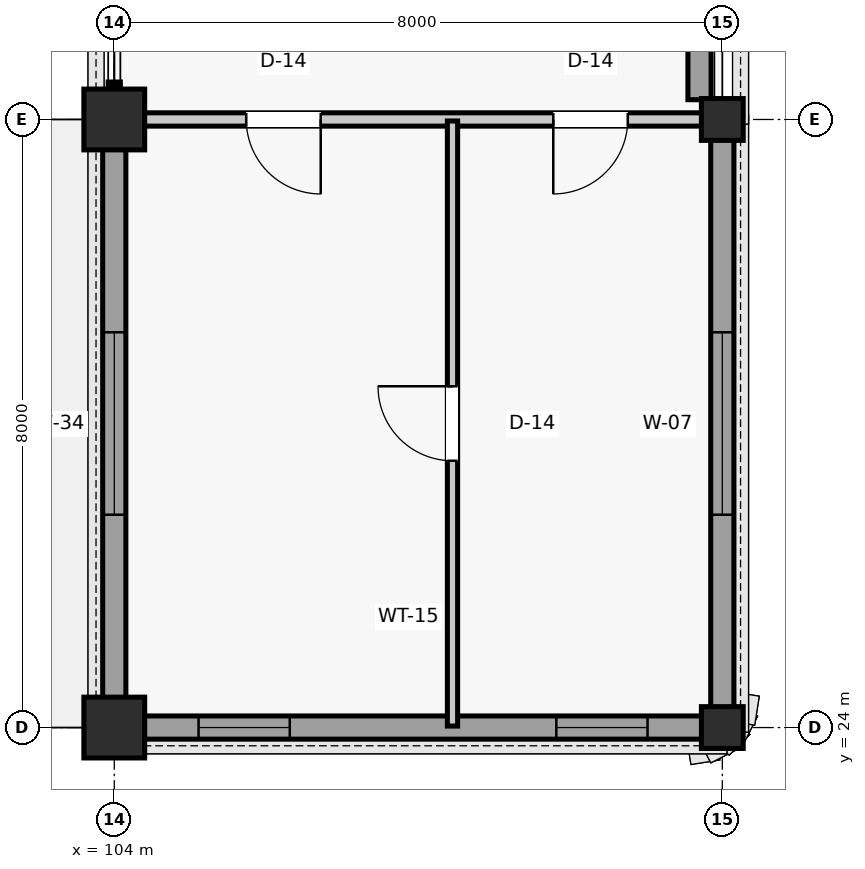
"""IFC4 building model, lengths in metres.
Left out: names, types, materials, properties, quantities, classifications, styles, units other than length and angle.
Written with IfcOpenShell. Run it as: python <this file> out.ifc"""

import sys

from ifc_helpers import new_model, si_unit, direction, frame, frame_2d, origin, origin_2d, place, context, subcontext, project, spatial, rectangle, extrude, element, fill, save


model = new_model("IFC4")
c1 = context("Model", 3, precision=1e-05, world=origin(), true_north=direction((0.0, 1.0)))
c2 = subcontext(c1, "Body", "Model", "MODEL_VIEW")
j1 = project(units=[si_unit("LENGTHUNIT", "METRE"), si_unit("PLANEANGLEUNIT", "RADIAN")], contexts=[c1])
p1 = place(None, origin())
s1 = spatial("IfcSite", under=j1, at=p1, CompositionType="ELEMENT")
p2 = place(p1, origin())
s2 = spatial("IfcBuilding", under=s1, at=p2, CompositionType="ELEMENT")
p3 = place(p2, frame((0.0, 0.0, 17.82)))
s3 = spatial("IfcBuildingStorey", under=s2, at=p3, CompositionType="ELEMENT", Elevation=17.82)
for number, where, z_axis, x_axis in (
    (1, (104.0, 24.0, 0.0), (0.0, 0.0, 1.0), (1.0, 0.0, 0.0)),
    (2, (104.0, 32.0, 0.0), (0.0, 0.0, 1.0), (1.0, 0.0, 0.0)),
):
    element("IfcColumn", number, at=place(p3, frame(where, z_axis=z_axis, x_axis=x_axis)), inside=s3, PredefinedType="COLUMN", context=c2, shape_type="SweptSolid", body=[
        extrude(rectangle(XDim=0.8, YDim=0.8, at=origin_2d()), origin(), (0.0, 0.0, 1.0), 3.96),
    ])
for number, where, z_axis, x_axis in (
    (3, (112.0, 24.0, 0.0), (0.0, 0.0, 1.0), (1.0, 0.0, 0.0)),
    (4, (112.0, 32.0, 0.0), (0.0, 0.0, 1.0), (1.0, 0.0, 0.0)),
):
    element("IfcColumn", number, at=place(p3, frame(where, z_axis=z_axis, x_axis=x_axis)), inside=s3, PredefinedType="COLUMN", context=c2, shape_type="SweptSolid", body=[
        extrude(rectangle(XDim=0.55, YDim=0.55, at=origin_2d()), origin(), (0.0, 0.0, 1.0), 3.96),
    ])
p4 = place(p3, frame((104.385, 24.0, 0.0), z_axis=(0.0, 0.0, 1.0), x_axis=(1.0, 0.0, 0.0)))
e5 = element("IfcWall", 5, at=p4, inside=s3, PredefinedType="SOLIDWALL", context=c2, shape_type="SweptSolid", body=[
    extrude(rectangle(XDim=7.355, YDim=0.305, at=frame_2d((3.677, 0.0))), origin(), (0.0, 0.0, 1.0), 2.817),
])
p5 = place(p4, frame((0.724, 0.0, 0.95)))
e6 = element("IfcOpeningElement", 6, at=p5, cuts=e5, PredefinedType="OPENING", context=c2, shape_type="SweptSolid", body=[
    extrude(rectangle(XDim=1.2, YDim=1.8, at=frame_2d((0.6, 0.9))), frame((0.0, 0.162, 0.0), z_axis=(0.0, -1.0, 0.0), x_axis=(1.0, 0.0, 0.0)), (0.0, 0.0, 1.0), 0.325),
])
p6 = place(p4, frame((5.431, 0.0, 0.95)))
e7 = element("IfcOpeningElement", 7, at=p6, cuts=e5, PredefinedType="OPENING", context=c2, shape_type="SweptSolid", body=[
    extrude(rectangle(XDim=1.2, YDim=1.8, at=frame_2d((0.6, 0.9))), frame((0.0, 0.162, 0.0), z_axis=(0.0, -1.0, 0.0), x_axis=(1.0, 0.0, 0.0)), (0.0, 0.0, 1.0), 0.325),
])
p7 = place(p3, frame((104.0, 24.385, 0.0), z_axis=(0.0, 0.0, 1.0), x_axis=(0.0, 1.0, 0.0)))
e8 = element("IfcWall", 8, at=p7, inside=s3, PredefinedType="SOLIDWALL", context=c2, shape_type="SweptSolid", body=[
    extrude(rectangle(XDim=7.23, YDim=0.305, at=frame_2d((3.615, 0.0))), origin(), (0.0, 0.0, 1.0), 3.002),
])
p8 = place(p7, frame((2.415, 0.0, 0.9)))
e9 = element("IfcOpeningElement", 9, at=p8, cuts=e8, PredefinedType="OPENING", context=c2, shape_type="SweptSolid", body=[
    extrude(rectangle(XDim=2.4, YDim=1.902, at=frame_2d((1.2, 0.951))), frame((0.0, 0.162, 0.0), z_axis=(0.0, -1.0, 0.0), x_axis=(1.0, 0.0, 0.0)), (0.0, 0.0, 1.0), 0.325),
])
p9 = place(p3, frame((112.0, 24.26, 0.0), z_axis=(0.0, 0.0, 1.0), x_axis=(0.0, 1.0, 0.0)))
e10 = element("IfcWall", 10, at=p9, inside=s3, PredefinedType="SOLIDWALL", context=c2, shape_type="SweptSolid", body=[
    extrude(rectangle(XDim=7.48, YDim=0.305, at=frame_2d((3.74, 0.0))), origin(), (0.0, 0.0, 1.0), 3.349),
])
p10 = place(p9, frame((2.54, 0.0, 0.9)))
e11 = element("IfcOpeningElement", 11, at=p10, cuts=e10, PredefinedType="OPENING", context=c2, shape_type="SweptSolid", body=[
    extrude(rectangle(XDim=2.4, YDim=2.0, at=frame_2d((1.2, 1.0))), frame((0.0, 0.162, 0.0), z_axis=(0.0, -1.0, 0.0), x_axis=(1.0, 0.0, 0.0)), (0.0, 0.0, 1.0), 0.325),
])
p11 = place(p3, frame((111.7, 32.26, 0.0), z_axis=(0.0, 0.0, 1.0), x_axis=(0.0, 1.0, 0.0)))
e12 = element("IfcWall", 12, at=p11, inside=s3, PredefinedType="SOLIDWALL", context=c2, shape_type="SweptSolid", body=[
    extrude(rectangle(XDim=7.48, YDim=0.305, at=frame_2d((3.74, 0.0))), origin(), (0.0, 0.0, 1.0), 3.289),
])
p12 = place(p3, frame((104.39, 32.0, 0.0), z_axis=(0.0, 0.0, 1.0), x_axis=(1.0, 0.0, 0.0)))
e13 = element("IfcWall", 13, at=p12, inside=s3, PredefinedType="PARTITIONING", context=c2, shape_type="SweptSolid", body=[
    extrude(rectangle(XDim=7.345, YDim=0.175, at=frame_2d((3.673, 0.0))), origin(), (0.0, 0.0, 1.0), 3.238),
])
p13 = place(p12, frame((1.346, 0.0, 0.0)))
e14 = element("IfcOpeningElement", 14, at=p13, cuts=e13, PredefinedType="OPENING", context=c2, shape_type="SweptSolid", body=[
    extrude(rectangle(XDim=0.98, YDim=2.15, at=frame_2d((0.49, 1.075))), frame((0.0, 0.097, 0.0), z_axis=(0.0, -1.0, 0.0), x_axis=(1.0, 0.0, 0.0)), (0.0, 0.0, 1.0), 0.195),
])
p14 = place(p12, frame((5.386, 0.0, 0.0)))
e15 = element("IfcOpeningElement", 15, at=p14, cuts=e13, PredefinedType="OPENING", context=c2, shape_type="SweptSolid", body=[
    extrude(rectangle(XDim=0.98, YDim=2.15, at=frame_2d((0.49, 1.075))), frame((0.0, 0.097, 0.0), z_axis=(0.0, -1.0, 0.0), x_axis=(1.0, 0.0, 0.0)), (0.0, 0.0, 1.0), 0.195),
])
p15 = place(p3, frame((108.45, 24.02, 0.0), z_axis=(0.0, 0.0, 1.0), x_axis=(0.0, 1.0, 0.0)))
e16 = element("IfcWall", 16, at=p15, inside=s3, PredefinedType="PARTITIONING", context=c2, shape_type="SweptSolid", body=[
    extrude(rectangle(XDim=7.96, YDim=0.135, at=frame_2d((3.98, 0.0))), origin(), (0.0, 0.0, 1.0), 2.81),
])
p16 = place(p15, frame((3.49, 0.0, 0.0)))
e17 = element("IfcOpeningElement", 17, at=p16, cuts=e16, PredefinedType="OPENING", context=c2, shape_type="SweptSolid", body=[
    extrude(rectangle(XDim=0.98, YDim=2.15, at=frame_2d((0.49, 1.075))), frame((0.0, 0.077, 0.0), z_axis=(0.0, -1.0, 0.0), x_axis=(1.0, 0.0, 0.0)), (0.0, 0.0, 1.0), 0.155),
])
p17 = place(p5, origin())
e18 = element("IfcWindow", 18, at=p17, inside=s3, PartitioningType="SINGLE_PANEL", PredefinedType="WINDOW", context=c2, shape_type="SweptSolid", body=[
    extrude(rectangle(XDim=1.2, YDim=1.8, at=frame_2d((0.6, 0.9))), frame((0.0, 0.03, 0.0), z_axis=(0.0, -1.0, 0.0), x_axis=(1.0, 0.0, 0.0)), (0.0, 0.0, 1.0), 0.06),
])
fill(e6, e18)
p18 = place(p6, origin())
e19 = element("IfcWindow", 19, at=p18, inside=s3, PartitioningType="SINGLE_PANEL", PredefinedType="WINDOW", context=c2, shape_type="SweptSolid", body=[
    extrude(rectangle(XDim=1.2, YDim=1.8, at=frame_2d((0.6, 0.9))), frame((0.0, 0.03, 0.0), z_axis=(0.0, -1.0, 0.0), x_axis=(1.0, 0.0, 0.0)), (0.0, 0.0, 1.0), 0.06),
])
fill(e7, e19)
p19 = place(p8, origin())
e20 = element("IfcWindow", 20, at=p19, inside=s3, PartitioningType="SINGLE_PANEL", PredefinedType="WINDOW", context=c2, shape_type="SweptSolid", body=[
    extrude(rectangle(XDim=2.4, YDim=1.902, at=frame_2d((1.2, 0.951))), frame((0.0, 0.03, 0.0), z_axis=(0.0, -1.0, 0.0), x_axis=(1.0, 0.0, 0.0)), (0.0, 0.0, 1.0), 0.06),
])
fill(e9, e20)
p20 = place(p10, origin())
e21 = element("IfcWindow", 21, at=p20, inside=s3, PartitioningType="SINGLE_PANEL", PredefinedType="WINDOW", context=c2, shape_type="SweptSolid", body=[
    extrude(rectangle(XDim=2.4, YDim=2.0, at=frame_2d((1.2, 1.0))), frame((0.0, 0.03, 0.0), z_axis=(0.0, -1.0, 0.0), x_axis=(1.0, 0.0, 0.0)), (0.0, 0.0, 1.0), 0.06),
])
fill(e11, e21)
p21 = place(p13, frame((0.98, 0.0, 0.0), z_axis=(0.0, 0.0, 1.0), x_axis=(-1.0, 0.0, 0.0)))
e22 = element("IfcDoor", 22, at=p21, inside=s3, OperationType="SINGLE_SWING_RIGHT", PredefinedType="DOOR", context=c2, shape_type="SweptSolid", body=[
    extrude(rectangle(XDim=0.98, YDim=2.15, at=frame_2d((0.49, 1.075))), frame((0.0, 0.025, 0.0), z_axis=(0.0, -1.0, 0.0), x_axis=(1.0, 0.0, 0.0)), (0.0, 0.0, 1.0), 0.05),
])
fill(e14, e22)
p22 = place(p14, frame((0.98, 0.0, 0.0), z_axis=(0.0, 0.0, 1.0), x_axis=(-1.0, 0.0, 0.0)))
e23 = element("IfcDoor", 23, at=p22, inside=s3, OperationType="SINGLE_SWING_LEFT", PredefinedType="DOOR", context=c2, shape_type="SweptSolid", body=[
    extrude(rectangle(XDim=0.98, YDim=2.15, at=frame_2d((0.49, 1.075))), frame((0.0, 0.025, 0.0), z_axis=(0.0, -1.0, 0.0), x_axis=(1.0, 0.0, 0.0)), (0.0, 0.0, 1.0), 0.05),
])
fill(e15, e23)
p23 = place(p16, origin())
e24 = element("IfcDoor", 24, at=p23, inside=s3, OperationType="SINGLE_SWING_RIGHT", PredefinedType="DOOR", context=c2, shape_type="SweptSolid", body=[
    extrude(rectangle(XDim=0.98, YDim=2.15, at=frame_2d((0.49, 1.075))), frame((0.0, 0.025, 0.0), z_axis=(0.0, -1.0, 0.0), x_axis=(1.0, 0.0, 0.0)), (0.0, 0.0, 1.0), 0.05),
])
fill(e17, e24)
save(model, sys.argv[1])
